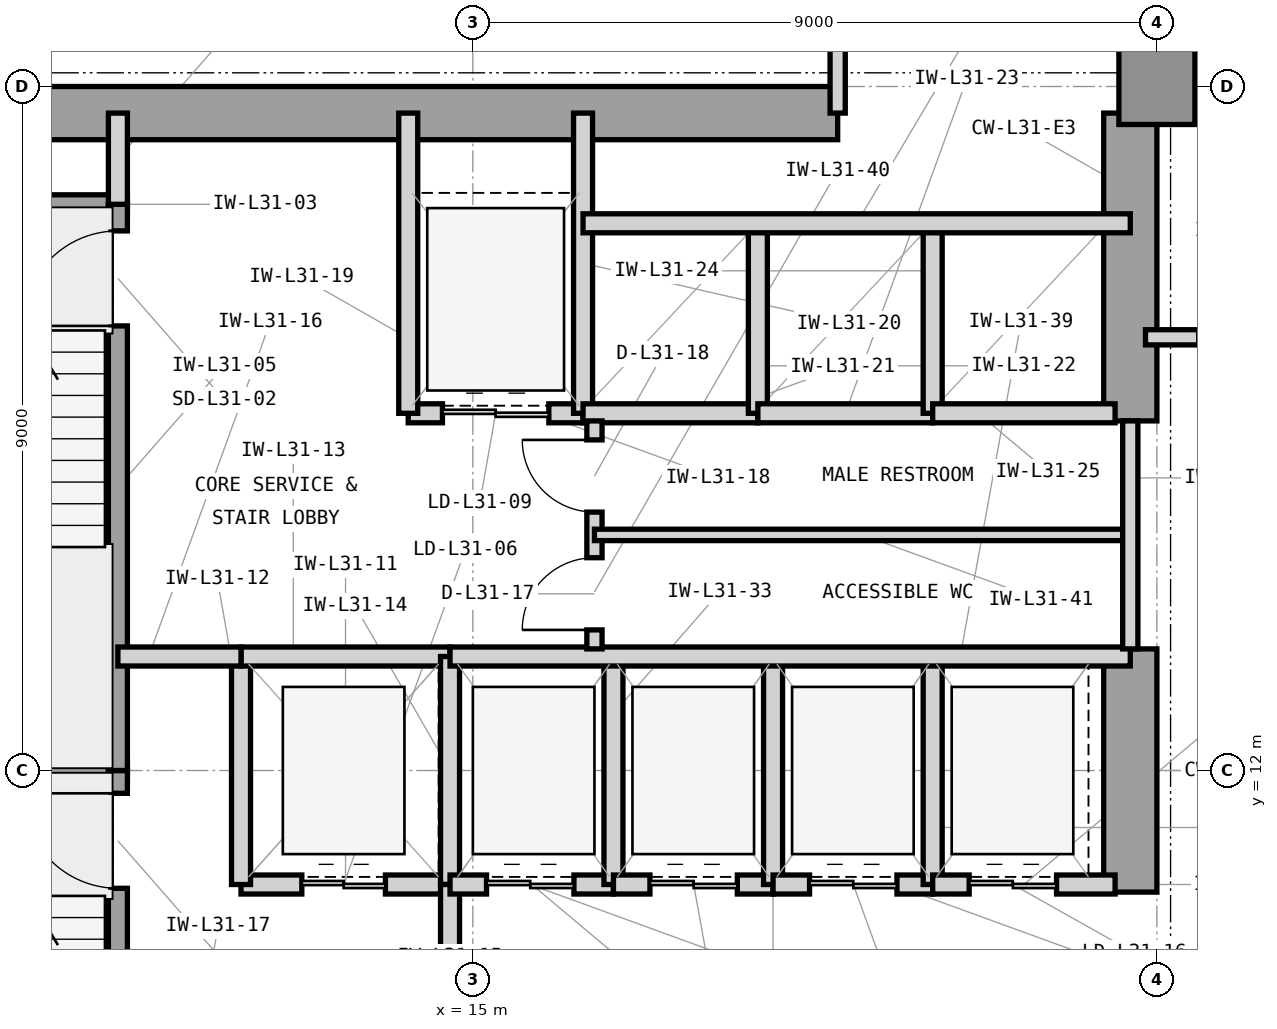
"""IFC4 building model, lengths in metres.
Left out: names, types, materials, properties, quantities, classifications, styles, units other than length and angle.
Written with IfcOpenShell. Run it as: python <this file> out.ifc"""

import sys

from ifc_helpers import new_model, si_unit, direction, frame, frame_2d, origin, origin_2d, place, context, subcontext, project, spatial, rectangle, extrude, element, fill, save


model = new_model("IFC4")
c1 = context("Model", 3, precision=1e-05, world=origin(), true_north=direction((0.0, 1.0)))
c2 = subcontext(c1, "Body", "Model", "MODEL_VIEW")
j1 = project(units=[si_unit("LENGTHUNIT", "METRE"), si_unit("PLANEANGLEUNIT", "RADIAN")], contexts=[c1])
p1 = place(None, origin())
s1 = spatial("IfcSite", under=j1, at=p1, CompositionType="ELEMENT")
p2 = place(p1, origin())
s2 = spatial("IfcBuilding", under=s1, at=p2, CompositionType="ELEMENT")
p3 = place(p2, frame((0.0, 0.0, 132.3)))
s3 = spatial("IfcBuildingStorey", under=s2, at=p3, CompositionType="ELEMENT", Elevation=132.3)
p4 = place(p3, frame((7.475, 20.65, 0.0), z_axis=(0.0, 0.0, 1.0), x_axis=(1.0, 0.0, 0.0)))
e1 = element("IfcWall", 1, at=p4, inside=s3, PredefinedType="SHEAR", context=c2, shape_type="SweptSolid", body=[
    extrude(rectangle(XDim=12.325, YDim=0.7, at=frame_2d((6.163, 0.0))), origin(), (0.0, 0.0, 1.0), 3.9),
])
p5 = place(p3, frame((23.65, 10.4, 0.0), z_axis=(0.0, 0.0, 1.0), x_axis=(0.0, 1.0, 0.0)))
e2 = element("IfcWall", 2, at=p5, inside=s3, PredefinedType="SHEAR", context=c2, shape_type="SweptSolid", body=[
    extrude(rectangle(XDim=3.2, YDim=0.7, at=frame_2d((1.6, 0.0))), origin(), (0.0, 0.0, 1.0), 3.9),
])
p6 = place(p3, frame((23.65, 16.6, 0.0), z_axis=(0.0, 0.0, 1.0), x_axis=(0.0, 1.0, 0.0)))
e3 = element("IfcWall", 3, at=p6, inside=s3, PredefinedType="SHEAR", context=c2, shape_type="SweptSolid", body=[
    extrude(rectangle(XDim=4.05, YDim=0.7, at=frame_2d((2.025, 0.0))), origin(), (0.0, 0.0, 1.0), 3.9),
])
p7 = place(p3, frame((24.0, 21.0, 0.0), z_axis=(0.0, 0.0, 1.0), x_axis=(1.0, 0.0, 0.0)))
e4 = element("IfcColumn", 4, at=p7, inside=s3, PredefinedType="COLUMN", context=c2, shape_type="SweptSolid", body=[
    extrude(rectangle(XDim=1.0, YDim=1.0, at=origin_2d()), origin(), (0.0, 0.0, 1.0), 3.9),
])
p8 = place(p3, frame((23.79, 21.0, 0.0), z_axis=(0.0, 0.0, 1.0), x_axis=(0.0, 1.0, 0.0)))
e5 = element("IfcWall", 5, at=p8, inside=s3, PredefinedType="STANDARD", context=c2, shape_type="SweptSolid", body=[
    extrude(rectangle(XDim=25.4, YDim=0.42, at=frame_2d((12.7, 0.0))), origin(), (0.0, 0.0, 1.0), 3.7),
])
p9 = place(p8, frame((11.45, 0.0, 0.85)))
e6 = element("IfcOpeningElement", 6, at=p9, cuts=e5, PredefinedType="OPENING", context=c2, shape_type="SweptSolid", body=[
    extrude(rectangle(XDim=2.5, YDim=2.25, at=frame_2d((1.25, 1.125))), frame((0.0, 0.22, 0.0), z_axis=(0.0, -1.0, 0.0), x_axis=(1.0, 0.0, 0.0)), (0.0, 0.0, 1.0), 0.44),
])
p10 = place(p3, frame((6.35, 12.0, 0.0), z_axis=(0.0, 0.0, 1.0), x_axis=(1.0, 0.0, 0.0)))
e7 = element("IfcWall", 7, at=p10, inside=s3, PredefinedType="SHEAR", context=c2, shape_type="SweptSolid", body=[
    extrude(rectangle(XDim=4.105, YDim=0.25, at=frame_2d((2.052, 0.0))), origin(), (0.0, 0.0, 1.0), 3.9),
])
p11 = place(p3, frame((7.7, 19.45, 0.0), z_axis=(0.0, 0.0, 1.0), x_axis=(1.0, 0.0, 0.0)))
e8 = element("IfcWall", 8, at=p11, inside=s3, PredefinedType="SHEAR", context=c2, shape_type="SweptSolid", body=[
    extrude(rectangle(XDim=2.755, YDim=0.25, at=frame_2d((1.377, 0.0))), origin(), (0.0, 0.0, 1.0), 3.9),
])
p12 = place(p3, frame((10.33, 4.55, 0.0), z_axis=(0.0, 0.0, 1.0), x_axis=(0.0, 1.0, 0.0)))
e9 = element("IfcWall", 9, at=p12, inside=s3, PredefinedType="SHEAR", context=c2, shape_type="SweptSolid", body=[
    extrude(rectangle(XDim=7.45, YDim=0.25, at=frame_2d((3.725, 0.0))), origin(), (0.0, 0.0, 1.0), 3.9),
])
p13 = place(p12, frame((5.9, 0.0, 0.0)))
e10 = element("IfcOpeningElement", 10, at=p13, cuts=e9, PredefinedType="OPENING", context=c2, shape_type="SweptSolid", body=[
    extrude(rectangle(XDim=1.25, YDim=2.2, at=frame_2d((0.625, 1.1))), frame((0.0, 0.135, 0.0), z_axis=(0.0, -1.0, 0.0), x_axis=(1.0, 0.0, 0.0)), (0.0, 0.0, 1.0), 0.27),
])
p14 = place(p3, frame((10.33, 12.0, 0.0), z_axis=(0.0, 0.0, 1.0), x_axis=(0.0, 1.0, 0.0)))
e11 = element("IfcWall", 11, at=p14, inside=s3, PredefinedType="SHEAR", context=c2, shape_type="SweptSolid", body=[
    extrude(rectangle(XDim=7.45, YDim=0.25, at=frame_2d((3.725, 0.0))), origin(), (0.0, 0.0, 1.0), 3.9),
])
p15 = place(p14, frame((5.85, 0.0, 0.0)))
e12 = element("IfcOpeningElement", 12, at=p15, cuts=e11, PredefinedType="OPENING", context=c2, shape_type="SweptSolid", body=[
    extrude(rectangle(XDim=1.25, YDim=2.2, at=frame_2d((0.625, 1.1))), frame((0.0, 0.135, 0.0), z_axis=(0.0, -1.0, 0.0), x_axis=(1.0, 0.0, 0.0)), (0.0, 0.0, 1.0), 0.27),
])
p16 = place(p3, frame((10.33, 19.45, 0.0), z_axis=(0.0, 0.0, 1.0), x_axis=(0.0, 1.0, 0.0)))
e13 = element("IfcWall", 13, at=p16, inside=s3, PredefinedType="PARTITIONING", context=c2, shape_type="SweptSolid", body=[
    extrude(rectangle(XDim=1.2, YDim=0.25, at=frame_2d((0.6, 0.0))), origin(), (0.0, 0.0, 1.0), 2.994),
])
p17 = place(p3, frame((11.95, 10.5, 0.0), z_axis=(0.0, 0.0, 1.0), x_axis=(1.0, 0.0, 0.0)))
e14 = element("IfcWall", 14, at=p17, inside=s3, PredefinedType="PARTITIONING", context=c2, shape_type="SweptSolid", body=[
    extrude(rectangle(XDim=2.75, YDim=0.25, at=frame_2d((1.375, 0.0))), origin(), (0.0, 0.0, 1.0), 3.233),
])
p18 = place(p17, frame((0.8, 0.0, 0.0)))
e15 = element("IfcOpeningElement", 15, at=p18, cuts=e14, PredefinedType="OPENING", context=c2, shape_type="SweptSolid", body=[
    extrude(rectangle(XDim=1.1, YDim=2.25, at=frame_2d((0.55, 1.125))), frame((0.0, 0.135, 0.0), z_axis=(0.0, -1.0, 0.0), x_axis=(1.0, 0.0, 0.0)), (0.0, 0.0, 1.0), 0.27),
])
p19 = place(p3, frame((11.95, 10.5, 0.0), z_axis=(0.0, 0.0, 1.0), x_axis=(0.0, 1.0, 0.0)))
e16 = element("IfcWall", 16, at=p19, inside=s3, PredefinedType="PARTITIONING", context=c2, shape_type="SweptSolid", body=[
    extrude(rectangle(XDim=3.0, YDim=0.25, at=frame_2d((1.5, 0.0))), origin(), (0.0, 0.0, 1.0), 3.69),
])
p20 = place(p3, frame((11.95, 13.5, 0.0), z_axis=(0.0, 0.0, 1.0), x_axis=(1.0, 0.0, 0.0)))
e17 = element("IfcWall", 17, at=p20, inside=s3, PredefinedType="PARTITIONING", context=c2, shape_type="SweptSolid", body=[
    extrude(rectangle(XDim=2.75, YDim=0.25, at=frame_2d((1.375, 0.0))), origin(), (0.0, 0.0, 1.0), 3.233),
])
p21 = place(p3, frame((14.7, 10.5, 0.0), z_axis=(0.0, 0.0, 1.0), x_axis=(0.0, 1.0, 0.0)))
e18 = element("IfcWall", 18, at=p21, inside=s3, PredefinedType="PARTITIONING", context=c2, shape_type="SweptSolid", body=[
    extrude(rectangle(XDim=3.0, YDim=0.25, at=frame_2d((1.5, 0.0))), origin(), (0.0, 0.0, 1.0), 3.69),
])
p22 = place(p3, frame((14.7, 6.7, 0.0), z_axis=(0.0, 0.0, 1.0), x_axis=(0.0, 1.0, 0.0)))
e19 = element("IfcWall", 19, at=p22, inside=s3, PredefinedType="PARTITIONING", context=c2, shape_type="SweptSolid", body=[
    extrude(rectangle(XDim=3.8, YDim=0.25, at=frame_2d((1.9, 0.0))), origin(), (0.0, 0.0, 1.0), 3.69),
])
p23 = place(p22, frame((1.3, 0.0, 0.0)))
e20 = element("IfcOpeningElement", 20, at=p23, cuts=e19, PredefinedType="OPENING", context=c2, shape_type="SweptSolid", body=[
    extrude(rectangle(XDim=1.2, YDim=2.2, at=frame_2d((0.6, 1.1))), frame((0.0, 0.135, 0.0), z_axis=(0.0, -1.0, 0.0), x_axis=(1.0, 0.0, 0.0)), (0.0, 0.0, 1.0), 0.27),
])
p24 = place(p3, frame((10.33, 13.5, 0.0), z_axis=(0.0, 0.0, 1.0), x_axis=(1.0, 0.0, 0.0)))
e21 = element("IfcWall", 21, at=p24, inside=s3, PredefinedType="PARTITIONING", context=c2, shape_type="SweptSolid", body=[
    extrude(rectangle(XDim=1.62, YDim=0.25, at=frame_2d((0.81, 0.0))), origin(), (0.0, 0.0, 1.0), 3.233),
])
p25 = place(p3, frame((14.15, 16.7, 0.0), z_axis=(0.0, 0.0, 1.0), x_axis=(1.0, 0.0, 0.0)))
e22 = element("IfcWall", 22, at=p25, inside=s3, PredefinedType="PARTITIONING", context=c2, shape_type="SweptSolid", body=[
    extrude(rectangle(XDim=2.3, YDim=0.25, at=frame_2d((1.15, 0.0))), origin(), (0.0, 0.0, 1.0), 3.233),
])
p26 = place(p25, frame((0.45, 0.0, 0.0)))
e23 = element("IfcOpeningElement", 23, at=p26, cuts=e22, PredefinedType="OPENING", context=c2, shape_type="SweptSolid", body=[
    extrude(rectangle(XDim=1.4, YDim=2.35, at=frame_2d((0.7, 1.175))), frame((0.0, 0.135, 0.0), z_axis=(0.0, -1.0, 0.0), x_axis=(1.0, 0.0, 0.0)), (0.0, 0.0, 1.0), 0.27),
])
for number, where, z_axis, x_axis in (
    (24, (14.15, 16.7, 0.0), (0.0, 0.0, 1.0), (0.0, 1.0, 0.0)),
    (25, (16.45, 16.7, 0.0), (0.0, 0.0, 1.0), (0.0, 1.0, 0.0)),
):
    element("IfcWall", number, at=place(p3, frame(where, z_axis=z_axis, x_axis=x_axis)), inside=s3, PredefinedType="PARTITIONING", context=c2, shape_type="SweptSolid", body=[
        extrude(rectangle(XDim=3.95, YDim=0.25, at=frame_2d((1.975, 0.0))), origin(), (0.0, 0.0, 1.0), 3.69),
    ])
p27 = place(p3, frame((16.45, 16.7, 0.0), z_axis=(0.0, 0.0, 1.0), x_axis=(1.0, 0.0, 0.0)))
e26 = element("IfcWall", 26, at=p27, inside=s3, PredefinedType="PARTITIONING", context=c2, shape_type="SweptSolid", body=[
    extrude(rectangle(XDim=2.3, YDim=0.25, at=frame_2d((1.15, 0.0))), origin(), (0.0, 0.0, 1.0), 3.233),
])
p28 = place(p3, frame((18.75, 16.7, 0.0), z_axis=(0.0, 0.0, 1.0), x_axis=(0.0, 1.0, 0.0)))
e27 = element("IfcWall", 27, at=p28, inside=s3, PredefinedType="PARTITIONING", context=c2, shape_type="SweptSolid", body=[
    extrude(rectangle(XDim=2.5, YDim=0.25, at=frame_2d((1.25, 0.0))), origin(), (0.0, 0.0, 1.0), 3.69),
])
p29 = place(p3, frame((18.75, 16.7, 0.0), z_axis=(0.0, 0.0, 1.0), x_axis=(1.0, 0.0, 0.0)))
e28 = element("IfcWall", 28, at=p29, inside=s3, PredefinedType="PARTITIONING", context=c2, shape_type="SweptSolid", body=[
    extrude(rectangle(XDim=2.3, YDim=0.25, at=frame_2d((1.15, 0.0))), origin(), (0.0, 0.0, 1.0), 3.233),
])
p30 = place(p3, frame((21.05, 16.7, 0.0), z_axis=(0.0, 0.0, 1.0), x_axis=(0.0, 1.0, 0.0)))
e29 = element("IfcWall", 29, at=p30, inside=s3, PredefinedType="PARTITIONING", context=c2, shape_type="SweptSolid", body=[
    extrude(rectangle(XDim=2.5, YDim=0.25, at=frame_2d((1.25, 0.0))), origin(), (0.0, 0.0, 1.0), 3.69),
])
p31 = place(p3, frame((21.05, 16.7, 0.0), z_axis=(0.0, 0.0, 1.0), x_axis=(1.0, 0.0, 0.0)))
e30 = element("IfcWall", 30, at=p31, inside=s3, PredefinedType="PARTITIONING", context=c2, shape_type="SweptSolid", body=[
    extrude(rectangle(XDim=2.4, YDim=0.25, at=frame_2d((1.2, 0.0))), origin(), (0.0, 0.0, 1.0), 3.233),
])
p32 = place(p3, frame((16.45, 19.2, 0.0), z_axis=(0.0, 0.0, 1.0), x_axis=(1.0, 0.0, 0.0)))
e31 = element("IfcWall", 31, at=p32, inside=s3, PredefinedType="PARTITIONING", context=c2, shape_type="SweptSolid", body=[
    extrude(rectangle(XDim=7.2, YDim=0.25, at=frame_2d((3.6, 0.0))), origin(), (0.0, 0.0, 1.0), 3.69),
])
p33 = place(p3, frame((14.7, 10.5, 0.0), z_axis=(0.0, 0.0, 1.0), x_axis=(1.0, 0.0, 0.0)))
e32 = element("IfcWall", 32, at=p33, inside=s3, PredefinedType="PARTITIONING", context=c2, shape_type="SweptSolid", body=[
    extrude(rectangle(XDim=2.15, YDim=0.25, at=frame_2d((1.075, 0.0))), origin(), (0.0, 0.0, 1.0), 3.233),
])
p34 = place(p33, frame((0.48, 0.0, 0.0)))
e33 = element("IfcOpeningElement", 33, at=p34, cuts=e32, PredefinedType="OPENING", context=c2, shape_type="SweptSolid", body=[
    extrude(rectangle(XDim=1.15, YDim=2.25, at=frame_2d((0.575, 1.125))), frame((0.0, 0.135, 0.0), z_axis=(0.0, -1.0, 0.0), x_axis=(1.0, 0.0, 0.0)), (0.0, 0.0, 1.0), 0.27),
])
p35 = place(p3, frame((16.85, 10.5, 0.0), z_axis=(0.0, 0.0, 1.0), x_axis=(0.0, 1.0, 0.0)))
e34 = element("IfcWall", 34, at=p35, inside=s3, PredefinedType="PARTITIONING", context=c2, shape_type="SweptSolid", body=[
    extrude(rectangle(XDim=3.0, YDim=0.25, at=frame_2d((1.5, 0.0))), origin(), (0.0, 0.0, 1.0), 3.69),
])
p36 = place(p3, frame((16.85, 10.5, 0.0), z_axis=(0.0, 0.0, 1.0), x_axis=(1.0, 0.0, 0.0)))
e35 = element("IfcWall", 35, at=p36, inside=s3, PredefinedType="PARTITIONING", context=c2, shape_type="SweptSolid", body=[
    extrude(rectangle(XDim=2.1, YDim=0.25, at=frame_2d((1.05, 0.0))), origin(), (0.0, 0.0, 1.0), 3.233),
])
p37 = place(p36, frame((0.48, 0.0, 0.0)))
e36 = element("IfcOpeningElement", 36, at=p37, cuts=e35, PredefinedType="OPENING", context=c2, shape_type="SweptSolid", body=[
    extrude(rectangle(XDim=1.15, YDim=2.25, at=frame_2d((0.575, 1.125))), frame((0.0, 0.135, 0.0), z_axis=(0.0, -1.0, 0.0), x_axis=(1.0, 0.0, 0.0)), (0.0, 0.0, 1.0), 0.27),
])
p38 = place(p3, frame((18.95, 10.5, 0.0), z_axis=(0.0, 0.0, 1.0), x_axis=(0.0, 1.0, 0.0)))
e37 = element("IfcWall", 37, at=p38, inside=s3, PredefinedType="PARTITIONING", context=c2, shape_type="SweptSolid", body=[
    extrude(rectangle(XDim=3.0, YDim=0.25, at=frame_2d((1.5, 0.0))), origin(), (0.0, 0.0, 1.0), 3.69),
])
p39 = place(p3, frame((18.95, 10.5, 0.0), z_axis=(0.0, 0.0, 1.0), x_axis=(1.0, 0.0, 0.0)))
e38 = element("IfcWall", 38, at=p39, inside=s3, PredefinedType="PARTITIONING", context=c2, shape_type="SweptSolid", body=[
    extrude(rectangle(XDim=2.1, YDim=0.25, at=frame_2d((1.05, 0.0))), origin(), (0.0, 0.0, 1.0), 3.233),
])
p40 = place(p39, frame((0.48, 0.0, 0.0)))
e39 = element("IfcOpeningElement", 39, at=p40, cuts=e38, PredefinedType="OPENING", context=c2, shape_type="SweptSolid", body=[
    extrude(rectangle(XDim=1.15, YDim=2.25, at=frame_2d((0.575, 1.125))), frame((0.0, 0.135, 0.0), z_axis=(0.0, -1.0, 0.0), x_axis=(1.0, 0.0, 0.0)), (0.0, 0.0, 1.0), 0.27),
])
p41 = place(p3, frame((21.05, 10.5, 0.0), z_axis=(0.0, 0.0, 1.0), x_axis=(0.0, 1.0, 0.0)))
e40 = element("IfcWall", 40, at=p41, inside=s3, PredefinedType="PARTITIONING", context=c2, shape_type="SweptSolid", body=[
    extrude(rectangle(XDim=3.0, YDim=0.25, at=frame_2d((1.5, 0.0))), origin(), (0.0, 0.0, 1.0), 3.69),
])
p42 = place(p3, frame((21.05, 10.5, 0.0), z_axis=(0.0, 0.0, 1.0), x_axis=(1.0, 0.0, 0.0)))
e41 = element("IfcWall", 41, at=p42, inside=s3, PredefinedType="PARTITIONING", context=c2, shape_type="SweptSolid", body=[
    extrude(rectangle(XDim=2.4, YDim=0.25, at=frame_2d((1.2, 0.0))), origin(), (0.0, 0.0, 1.0), 3.233),
])
p43 = place(p42, frame((0.48, 0.0, 0.0)))
e42 = element("IfcOpeningElement", 42, at=p43, cuts=e41, PredefinedType="OPENING", context=c2, shape_type="SweptSolid", body=[
    extrude(rectangle(XDim=1.15, YDim=2.25, at=frame_2d((0.575, 1.125))), frame((0.0, 0.135, 0.0), z_axis=(0.0, -1.0, 0.0), x_axis=(1.0, 0.0, 0.0)), (0.0, 0.0, 1.0), 0.27),
])
p44 = place(p3, frame((14.7, 13.5, 0.0), z_axis=(0.0, 0.0, 1.0), x_axis=(1.0, 0.0, 0.0)))
e43 = element("IfcWall", 43, at=p44, inside=s3, PredefinedType="PARTITIONING", context=c2, shape_type="SweptSolid", body=[
    extrude(rectangle(XDim=8.95, YDim=0.25, at=frame_2d((4.475, 0.0))), origin(), (0.0, 0.0, 1.0), 3.233),
])
p45 = place(p3, frame((16.6, 13.6, 0.0), z_axis=(0.0, 0.0, 1.0), x_axis=(0.0, 1.0, 0.0)))
e44 = element("IfcWall", 44, at=p45, inside=s3, PredefinedType="PARTITIONING", context=c2, shape_type="SweptSolid", body=[
    extrude(rectangle(XDim=3.0, YDim=0.2, at=frame_2d((1.5, 0.0))), origin(), (0.0, 0.0, 1.0), 3.69),
])
p46 = place(p45, frame((0.25, 0.0, 0.0)))
e45 = element("IfcOpeningElement", 45, at=p46, cuts=e44, PredefinedType="OPENING", context=c2, shape_type="SweptSolid", body=[
    extrude(rectangle(XDim=0.95, YDim=2.1, at=frame_2d((0.475, 1.05))), frame((0.0, 0.11, 0.0), z_axis=(0.0, -1.0, 0.0), x_axis=(1.0, 0.0, 0.0)), (0.0, 0.0, 1.0), 0.22),
])
p47 = place(p45, frame((1.8, 0.0, 0.0)))
e46 = element("IfcOpeningElement", 46, at=p47, cuts=e44, PredefinedType="OPENING", context=c2, shape_type="SweptSolid", body=[
    extrude(rectangle(XDim=0.95, YDim=2.1, at=frame_2d((0.475, 1.05))), frame((0.0, 0.11, 0.0), z_axis=(0.0, -1.0, 0.0), x_axis=(1.0, 0.0, 0.0)), (0.0, 0.0, 1.0), 0.22),
])
p48 = place(p3, frame((16.6, 15.1, 0.0), z_axis=(0.0, 0.0, 1.0), x_axis=(1.0, 0.0, 0.0)))
e47 = element("IfcWall", 47, at=p48, inside=s3, PredefinedType="PARTITIONING", context=c2, shape_type="SweptSolid", body=[
    extrude(rectangle(XDim=7.05, YDim=0.15, at=frame_2d((3.525, 0.0))), origin(), (0.0, 0.0, 1.0), 3.69),
])
p49 = place(p3, frame((23.65, 13.6, 0.0), z_axis=(0.0, 0.0, 1.0), x_axis=(0.0, 1.0, 0.0)))
e48 = element("IfcWall", 48, at=p49, inside=s3, PredefinedType="PARTITIONING", context=c2, shape_type="SweptSolid", body=[
    extrude(rectangle(XDim=3.0, YDim=0.2, at=frame_2d((1.5, 0.0))), origin(), (0.0, 0.0, 1.0), 3.69),
])
p50 = place(p3, frame((23.85, 17.7, 0.0), z_axis=(0.0, 0.0, 1.0), x_axis=(1.0, 0.0, 0.0)))
e49 = element("IfcWall", 49, at=p50, inside=s3, PredefinedType="PARTITIONING", context=c2, shape_type="SweptSolid", body=[
    extrude(rectangle(XDim=2.85, YDim=0.2, at=frame_2d((1.425, 0.0))), origin(), (0.0, 0.0, 1.0), 3.69),
])
p51 = place(p50, frame((0.7, 0.0, 0.0)))
e50 = element("IfcOpeningElement", 50, at=p51, cuts=e49, PredefinedType="OPENING", context=c2, shape_type="SweptSolid", body=[
    extrude(rectangle(XDim=1.0, YDim=2.15, at=frame_2d((0.5, 1.075))), frame((0.0, 0.11, 0.0), z_axis=(0.0, -1.0, 0.0), x_axis=(1.0, 0.0, 0.0)), (0.0, 0.0, 1.0), 0.22),
])
p52 = place(p3, frame((19.8, 20.65, 0.0), z_axis=(0.0, 0.0, 1.0), x_axis=(0.0, 1.0, 0.0)))
e51 = element("IfcWall", 51, at=p52, inside=s3, PredefinedType="PARTITIONING", context=c2, shape_type="SweptSolid", body=[
    extrude(rectangle(XDim=6.15, YDim=0.2, at=frame_2d((3.075, 0.0))), origin(), (0.0, 0.0, 1.0), 3.69),
])
p53 = place(p13, origin())
e52 = element("IfcDoor", 52, at=p53, inside=s3, OperationType="SINGLE_SWING_RIGHT", PredefinedType="DOOR", context=c2, shape_type="SweptSolid", body=[
    extrude(rectangle(XDim=1.25, YDim=2.2, at=frame_2d((0.625, 1.1))), frame((0.0, 0.025, 0.0), z_axis=(0.0, -1.0, 0.0), x_axis=(1.0, 0.0, 0.0)), (0.0, 0.0, 1.0), 0.05),
])
fill(e10, e52)
p54 = place(p15, origin())
e53 = element("IfcDoor", 53, at=p54, inside=s3, OperationType="SINGLE_SWING_LEFT", PredefinedType="DOOR", context=c2, shape_type="SweptSolid", body=[
    extrude(rectangle(XDim=1.25, YDim=2.2, at=frame_2d((0.625, 1.1))), frame((0.0, 0.025, 0.0), z_axis=(0.0, -1.0, 0.0), x_axis=(1.0, 0.0, 0.0)), (0.0, 0.0, 1.0), 0.05),
])
fill(e12, e53)
p55 = place(p18, origin())
e54 = element("IfcDoor", 54, at=p55, inside=s3, OperationType="DOUBLE_DOOR_SLIDING", PredefinedType="DOOR", context=c2, shape_type="SweptSolid", body=[
    extrude(rectangle(XDim=1.1, YDim=2.25, at=frame_2d((0.55, 1.125))), frame((0.0, 0.025, 0.0), z_axis=(0.0, -1.0, 0.0), x_axis=(1.0, 0.0, 0.0)), (0.0, 0.0, 1.0), 0.05),
])
fill(e15, e54)
p56 = place(p26, origin())
e55 = element("IfcDoor", 55, at=p56, inside=s3, OperationType="DOUBLE_DOOR_SLIDING", PredefinedType="DOOR", context=c2, shape_type="SweptSolid", body=[
    extrude(rectangle(XDim=1.4, YDim=2.35, at=frame_2d((0.7, 1.175))), frame((0.0, 0.025, 0.0), z_axis=(0.0, -1.0, 0.0), x_axis=(1.0, 0.0, 0.0)), (0.0, 0.0, 1.0), 0.05),
])
fill(e23, e55)
p57 = place(p34, origin())
e56 = element("IfcDoor", 56, at=p57, inside=s3, OperationType="DOUBLE_DOOR_SLIDING", PredefinedType="DOOR", context=c2, shape_type="SweptSolid", body=[
    extrude(rectangle(XDim=1.15, YDim=2.25, at=frame_2d((0.575, 1.125))), frame((0.0, 0.025, 0.0), z_axis=(0.0, -1.0, 0.0), x_axis=(1.0, 0.0, 0.0)), (0.0, 0.0, 1.0), 0.05),
])
fill(e33, e56)
p58 = place(p37, origin())
e57 = element("IfcDoor", 57, at=p58, inside=s3, OperationType="DOUBLE_DOOR_SLIDING", PredefinedType="DOOR", context=c2, shape_type="SweptSolid", body=[
    extrude(rectangle(XDim=1.15, YDim=2.25, at=frame_2d((0.575, 1.125))), frame((0.0, 0.025, 0.0), z_axis=(0.0, -1.0, 0.0), x_axis=(1.0, 0.0, 0.0)), (0.0, 0.0, 1.0), 0.05),
])
fill(e36, e57)
p59 = place(p40, origin())
e58 = element("IfcDoor", 58, at=p59, inside=s3, OperationType="DOUBLE_DOOR_SLIDING", PredefinedType="DOOR", context=c2, shape_type="SweptSolid", body=[
    extrude(rectangle(XDim=1.15, YDim=2.25, at=frame_2d((0.575, 1.125))), frame((0.0, 0.025, 0.0), z_axis=(0.0, -1.0, 0.0), x_axis=(1.0, 0.0, 0.0)), (0.0, 0.0, 1.0), 0.05),
])
fill(e39, e58)
p60 = place(p43, origin())
e59 = element("IfcDoor", 59, at=p60, inside=s3, OperationType="DOUBLE_DOOR_SLIDING", PredefinedType="DOOR", context=c2, shape_type="SweptSolid", body=[
    extrude(rectangle(XDim=1.15, YDim=2.25, at=frame_2d((0.575, 1.125))), frame((0.0, 0.025, 0.0), z_axis=(0.0, -1.0, 0.0), x_axis=(1.0, 0.0, 0.0)), (0.0, 0.0, 1.0), 0.05),
])
fill(e42, e59)
p61 = place(p46, origin())
e60 = element("IfcDoor", 60, at=p61, inside=s3, OperationType="SINGLE_SWING_LEFT", PredefinedType="DOOR", context=c2, shape_type="SweptSolid", body=[
    extrude(rectangle(XDim=0.95, YDim=2.1, at=frame_2d((0.475, 1.05))), frame((0.0, 0.025, 0.0), z_axis=(0.0, -1.0, 0.0), x_axis=(1.0, 0.0, 0.0)), (0.0, 0.0, 1.0), 0.05),
])
fill(e45, e60)
p62 = place(p47, origin())
e61 = element("IfcDoor", 61, at=p62, inside=s3, OperationType="SINGLE_SWING_RIGHT", PredefinedType="DOOR", context=c2, shape_type="SweptSolid", body=[
    extrude(rectangle(XDim=0.95, YDim=2.1, at=frame_2d((0.475, 1.05))), frame((0.0, 0.025, 0.0), z_axis=(0.0, -1.0, 0.0), x_axis=(1.0, 0.0, 0.0)), (0.0, 0.0, 1.0), 0.05),
])
fill(e46, e61)
save(model, sys.argv[1])
